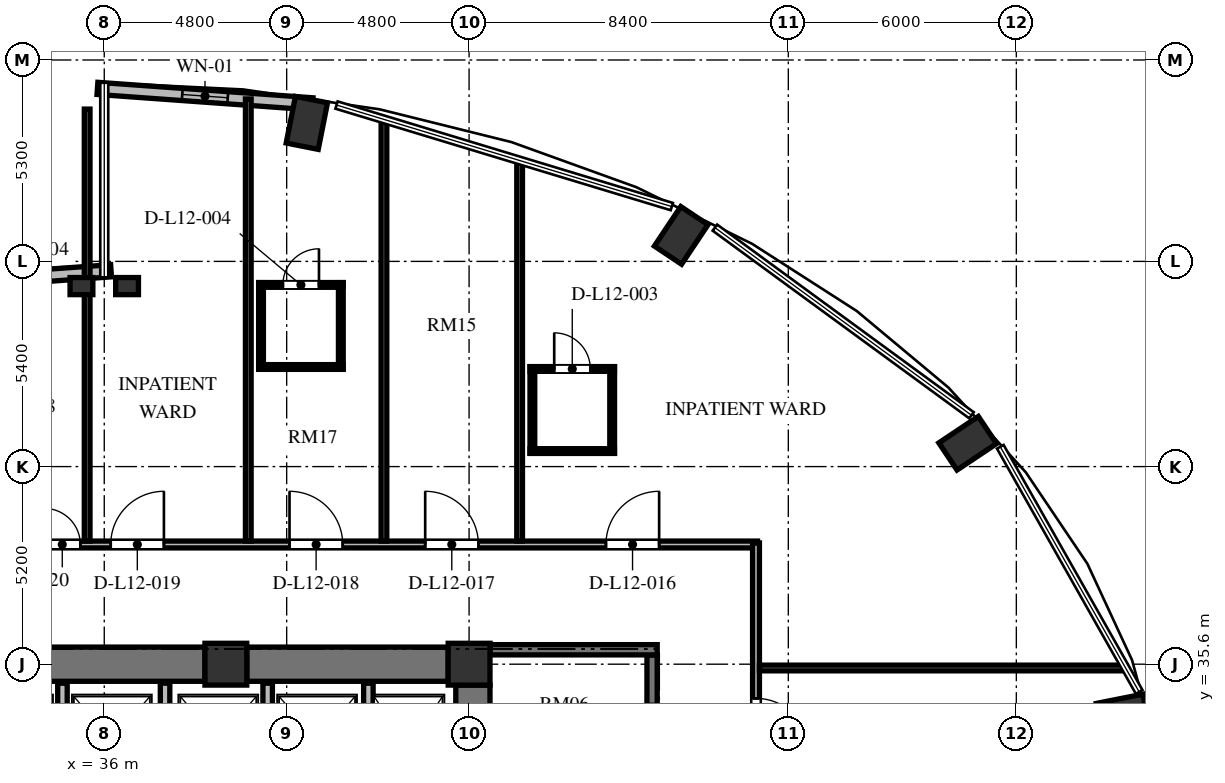
"""IFC4 building model, lengths in metres.
Left out: names, types, materials, properties, quantities, classifications, styles, units other than length and angle.
Written with IfcOpenShell. Run it as: python <this file> out.ifc"""

import sys

from ifc_helpers import new_model, si_unit, direction, frame, frame_2d, origin, origin_2d, place, context, subcontext, project, spatial, rectangle, extrude, element, fill, save


model = new_model("IFC4")
c1 = context("Model", 3, precision=1e-05, world=origin(), true_north=direction((0.0, 1.0)))
c2 = subcontext(c1, "Body", "Model", "MODEL_VIEW")
j1 = project(units=[si_unit("LENGTHUNIT", "METRE"), si_unit("PLANEANGLEUNIT", "RADIAN")], contexts=[c1])
p1 = place(None, origin())
s1 = spatial("IfcSite", under=j1, at=p1, CompositionType="ELEMENT")
p2 = place(p1, origin())
s2 = spatial("IfcBuilding", under=s1, at=p2, CompositionType="ELEMENT")
p3 = place(p2, frame((0.0, 0.0, 50.736)))
s3 = spatial("IfcBuildingStorey", under=s2, at=p3, CompositionType="ELEMENT", Elevation=50.736)
for number, where, z_axis, x_axis in (
    (1, (62.8, 34.268, 0.0), (0.0, 0.0, 1.0), (0.981, 0.195, 0.0)),
    (2, (58.72, 41.414, 0.0), (0.0, 0.0, 1.0), (0.831, 0.556, 0.0)),
    (3, (51.181, 46.884, 0.0), (0.0, 0.0, 1.0), (0.556, 0.831, 0.0)),
    (4, (41.331, 49.844, 0.0), (0.0, 0.0, 1.0), (0.195, 0.981, 0.0)),
):
    element("IfcColumn", number, at=place(p3, frame(where, z_axis=z_axis, x_axis=x_axis)), inside=s3, PredefinedType="COLUMN", context=c2, shape_type="SweptSolid", body=[
        extrude(rectangle(XDim=1.25, YDim=0.86, at=origin_2d()), origin(), (0.0, 0.0, 1.0), 3.648),
    ])
for number, where, z_axis, x_axis in (
    (5, (45.6, 35.6, 0.0), (0.0, 0.0, 1.0), (1.0, 0.0, 0.0)),
    (6, (39.2, 35.6, 0.0), (0.0, 0.0, 1.0), (1.0, 0.0, 0.0)),
):
    element("IfcColumn", number, at=place(p3, frame(where, z_axis=z_axis, x_axis=x_axis)), inside=s3, PredefinedType="COLUMN", context=c2, shape_type="SweptSolid", body=[
        extrude(rectangle(XDim=1.1, YDim=1.1, at=origin_2d()), origin(), (0.0, 0.0, 1.0), 3.648),
    ])
for number, where, z_axis, x_axis in (
    (7, (35.4, 45.55, 0.0), (0.0, 0.0, 1.0), (1.0, 0.0, 0.0)),
    (8, (36.6, 45.55, 0.0), (0.0, 0.0, 1.0), (1.0, 0.0, 0.0)),
):
    element("IfcColumn", number, at=place(p3, frame(where, z_axis=z_axis, x_axis=x_axis)), inside=s3, PredefinedType="PILASTER", context=c2, shape_type="SweptSolid", body=[
        extrude(rectangle(XDim=0.6, YDim=0.45, at=origin_2d()), origin(), (0.0, 0.0, 1.0), 3.648),
    ])
p4 = place(p3, frame((45.7, 20.95, 0.0), z_axis=(0.0, 0.0, 1.0), x_axis=(0.0, 1.0, 0.0)))
e9 = element("IfcWall", 9, at=p4, inside=s3, PredefinedType="SHEAR", context=c2, shape_type="SweptSolid", body=[
    extrude(rectangle(XDim=14.1, YDim=0.9, at=frame_2d((7.05, 0.0))), origin(), (0.0, 0.0, 1.0), 3.648),
])
p5 = place(p4, frame((11.75, 0.0, 0.0)))
e10 = element("IfcOpeningElement", 10, at=p5, cuts=e9, PredefinedType="OPENING", context=c2, shape_type="SweptSolid", body=[
    extrude(rectangle(XDim=1.4, YDim=2.3, at=frame_2d((0.7, 1.15))), frame((0.0, 0.46, 0.0), z_axis=(0.0, -1.0, 0.0), x_axis=(1.0, 0.0, 0.0)), (0.0, 0.0, 1.0), 0.92),
])
p6 = place(p4, frame((0.95, 0.0, 0.0)))
e11 = element("IfcOpeningElement", 11, at=p6, cuts=e9, PredefinedType="OPENING", context=c2, shape_type="SweptSolid", body=[
    extrude(rectangle(XDim=1.4, YDim=2.3, at=frame_2d((0.7, 1.15))), frame((0.0, 0.46, 0.0), z_axis=(0.0, -1.0, 0.0), x_axis=(1.0, 0.0, 0.0)), (0.0, 0.0, 1.0), 0.92),
])
p7 = place(p3, frame((33.35, 35.6, 0.0), z_axis=(0.0, 0.0, 1.0), x_axis=(1.0, 0.0, 0.0)))
e12 = element("IfcWall", 12, at=p7, inside=s3, PredefinedType="SHEAR", context=c2, shape_type="SweptSolid", body=[
    extrude(rectangle(XDim=5.3, YDim=0.9, at=frame_2d((2.65, 0.0))), origin(), (0.0, 0.0, 1.0), 3.648),
])
p8 = place(p3, frame((39.75, 35.6, 0.0), z_axis=(0.0, 0.0, 1.0), x_axis=(1.0, 0.0, 0.0)))
e13 = element("IfcWall", 13, at=p8, inside=s3, PredefinedType="SHEAR", context=c2, shape_type="SweptSolid", body=[
    extrude(rectangle(XDim=5.3, YDim=0.9, at=frame_2d((2.65, 0.0))), origin(), (0.0, 0.0, 1.0), 3.648),
])
p9 = place(p3, frame((41.481, 50.346, 0.0), z_axis=(0.0, 0.0, 1.0), x_axis=(-0.997422321809, 0.071754525696, 0.0)))
e14 = element("IfcWall", 14, at=p9, inside=s3, PredefinedType="SOLIDWALL", context=c2, shape_type="SweptSolid", body=[
    extrude(rectangle(XDim=5.675, YDim=0.32, at=frame_2d((2.838, 0.0))), origin(), (0.0, 0.0, 1.0), 3.428),
])
p10 = place(p9, frame((2.238, 0.0, 0.85)))
e15 = element("IfcOpeningElement", 15, at=p10, cuts=e14, PredefinedType="OPENING", context=c2, shape_type="SweptSolid", body=[
    extrude(rectangle(XDim=1.2, YDim=2.2, at=frame_2d((0.6, 1.1))), frame((0.0, 0.17, 0.0), z_axis=(0.0, -1.0, 0.0), x_axis=(1.0, 0.0, 0.0)), (0.0, 0.0, 1.0), 0.34),
])
p11 = place(p3, frame((36.179, 45.953, 0.0), z_axis=(0.0, 0.0, 1.0), x_axis=(-0.997421878774, -0.071760683825, 0.0)))
e16 = element("IfcWall", 16, at=p11, inside=s3, PredefinedType="SOLIDWALL", context=c2, shape_type="SweptSolid", body=[
    extrude(rectangle(XDim=5.675, YDim=0.32, at=frame_2d((2.837, 0.0))), origin(), (0.0, 0.0, 1.0), 3.428),
])
p12 = place(p11, frame((2.007, 0.0, 0.85)))
e17 = element("IfcOpeningElement", 17, at=p12, cuts=e16, PredefinedType="OPENING", context=c2, shape_type="SweptSolid", body=[
    extrude(rectangle(XDim=1.2, YDim=1.8, at=frame_2d((0.6, 0.9))), frame((0.0, 0.17, 0.0), z_axis=(0.0, -1.0, 0.0), x_axis=(1.0, 0.0, 0.0)), (0.0, 0.0, 1.0), 0.34),
])
p13 = place(p3, frame((42.95, 31.92, 0.0), z_axis=(0.0, 0.0, 1.0), x_axis=(0.0, 1.0, 0.0)))
e18 = element("IfcWall", 18, at=p13, inside=s3, PredefinedType="SOLIDWALL", context=c2, shape_type="SweptSolid", body=[
    extrude(rectangle(XDim=3.18, YDim=0.25, at=frame_2d((1.59, 0.0))), origin(), (0.0, 0.0, 1.0), 3.428),
])
for number, where, z_axis, x_axis in (
    (19, (34.9, 32.42, 0.0), (0.0, 0.0, 1.0), (0.0, 1.0, 0.0)),
    (20, (37.6, 32.42, 0.0), (0.0, 0.0, 1.0), (0.0, 1.0, 0.0)),
    (21, (40.3, 32.42, 0.0), (0.0, 0.0, 1.0), (0.0, 1.0, 0.0)),
):
    element("IfcWall", number, at=place(p3, frame(where, z_axis=z_axis, x_axis=x_axis)), inside=s3, PredefinedType="SOLIDWALL", context=c2, shape_type="SweptSolid", body=[
        extrude(rectangle(XDim=2.68, YDim=0.25, at=frame_2d((1.34, 0.0))), origin(), (0.0, 0.0, 1.0), 3.428),
    ])
p14 = place(p3, frame((50.415, 35.845, 0.0), z_axis=(0.0, 0.0, 1.0), x_axis=(0.0, -1.0, 0.0)))
e22 = element("IfcWall", 22, at=p14, inside=s3, PredefinedType="SHEAR", context=c2, shape_type="SweptSolid", body=[
    extrude(rectangle(XDim=15.825, YDim=0.27, at=frame_2d((7.913, 0.0))), origin(), (0.0, 0.0, 1.0), 3.648),
])
p15 = place(p14, frame((4.445, 0.0, 0.0)))
e23 = element("IfcOpeningElement", 23, at=p15, cuts=e22, PredefinedType="OPENING", context=c2, shape_type="SweptSolid", body=[
    extrude(rectangle(XDim=1.2, YDim=2.15, at=frame_2d((0.6, 1.075))), frame((0.0, 0.145, 0.0), z_axis=(0.0, -1.0, 0.0), x_axis=(1.0, 0.0, 0.0)), (0.0, 0.0, 1.0), 0.29),
])
p16 = place(p14, frame((1.295, 0.0, 0.0)))
e24 = element("IfcOpeningElement", 24, at=p16, cuts=e22, PredefinedType="OPENING", context=c2, shape_type="SweptSolid", body=[
    extrude(rectangle(XDim=1.3, YDim=2.2, at=frame_2d((0.65, 1.1))), frame((0.0, 0.145, 0.0), z_axis=(0.0, -1.0, 0.0), x_axis=(1.0, 0.0, 0.0)), (0.0, 0.0, 1.0), 0.29),
])
p17 = place(p14, frame((13.095, 0.0, 0.0)))
e25 = element("IfcOpeningElement", 25, at=p17, cuts=e22, PredefinedType="OPENING", context=c2, shape_type="SweptSolid", body=[
    extrude(rectangle(XDim=1.3, YDim=2.2, at=frame_2d((0.65, 1.1))), frame((0.0, 0.145, 0.0), z_axis=(0.0, -1.0, 0.0), x_axis=(1.0, 0.0, 0.0)), (0.0, 0.0, 1.0), 0.29),
])
p18 = place(p3, frame((46.15, 35.98, 0.0), z_axis=(0.0, 0.0, 1.0), x_axis=(1.0, 0.0, 0.0)))
e26 = element("IfcWall", 26, at=p18, inside=s3, PredefinedType="SHEAR", context=c2, shape_type="SweptSolid", body=[
    extrude(rectangle(XDim=4.4, YDim=0.27, at=frame_2d((2.2, 0.0))), origin(), (0.0, 0.0, 1.0), 3.648),
])
p19 = place(p3, frame((23.31, 38.75, 0.0), z_axis=(0.0, 0.0, 1.0), x_axis=(1.0, 0.0, 0.0)))
e27 = element("IfcWall", 27, at=p19, inside=s3, PredefinedType="PARTITIONING", context=c2, shape_type="SweptSolid", body=[
    extrude(rectangle(XDim=29.88, YDim=0.18, at=frame_2d((14.94, 0.0))), origin(), (0.0, 0.0, 1.0), 3.053),
])
p20 = place(p19, frame((25.891, 0.0, 0.0)))
e28 = element("IfcOpeningElement", 28, at=p20, cuts=e27, PredefinedType="OPENING", context=c2, shape_type="SweptSolid", body=[
    extrude(rectangle(XDim=1.4, YDim=2.2, at=frame_2d((0.7, 1.1))), frame((0.0, 0.1, 0.0), z_axis=(0.0, -1.0, 0.0), x_axis=(1.0, 0.0, 0.0)), (0.0, 0.0, 1.0), 0.2),
])
p21 = place(p19, frame((21.135, 0.0, 0.0)))
e29 = element("IfcOpeningElement", 29, at=p21, cuts=e27, PredefinedType="OPENING", context=c2, shape_type="SweptSolid", body=[
    extrude(rectangle(XDim=1.4, YDim=2.2, at=frame_2d((0.7, 1.1))), frame((0.0, 0.1, 0.0), z_axis=(0.0, -1.0, 0.0), x_axis=(1.0, 0.0, 0.0)), (0.0, 0.0, 1.0), 0.2),
])
p22 = place(p19, frame((17.565, 0.0, 0.0)))
e30 = element("IfcOpeningElement", 30, at=p22, cuts=e27, PredefinedType="OPENING", context=c2, shape_type="SweptSolid", body=[
    extrude(rectangle(XDim=1.4, YDim=2.2, at=frame_2d((0.7, 1.1))), frame((0.0, 0.1, 0.0), z_axis=(0.0, -1.0, 0.0), x_axis=(1.0, 0.0, 0.0)), (0.0, 0.0, 1.0), 0.2),
])
p23 = place(p19, frame((12.86, 0.0, 0.0)))
e31 = element("IfcOpeningElement", 31, at=p23, cuts=e27, PredefinedType="OPENING", context=c2, shape_type="SweptSolid", body=[
    extrude(rectangle(XDim=1.4, YDim=2.2, at=frame_2d((0.7, 1.1))), frame((0.0, 0.1, 0.0), z_axis=(0.0, -1.0, 0.0), x_axis=(1.0, 0.0, 0.0)), (0.0, 0.0, 1.0), 0.2),
])
p24 = place(p19, frame((11.11, 0.0, 0.0)))
e32 = element("IfcOpeningElement", 32, at=p24, cuts=e27, PredefinedType="OPENING", context=c2, shape_type="SweptSolid", body=[
    extrude(rectangle(XDim=0.95, YDim=2.1, at=frame_2d((0.475, 1.05))), frame((0.0, 0.1, 0.0), z_axis=(0.0, -1.0, 0.0), x_axis=(1.0, 0.0, 0.0)), (0.0, 0.0, 1.0), 0.2),
])
p25 = place(p19, frame((6.845, 0.0, 0.0)))
e33 = element("IfcOpeningElement", 33, at=p25, cuts=e27, PredefinedType="OPENING", context=c2, shape_type="SweptSolid", body=[
    extrude(rectangle(XDim=1.4, YDim=2.2, at=frame_2d((0.7, 1.1))), frame((0.0, 0.1, 0.0), z_axis=(0.0, -1.0, 0.0), x_axis=(1.0, 0.0, 0.0)), (0.0, 0.0, 1.0), 0.2),
])
p26 = place(p19, frame((2.339, 0.0, 0.0)))
e34 = element("IfcOpeningElement", 34, at=p26, cuts=e27, PredefinedType="OPENING", context=c2, shape_type="SweptSolid", body=[
    extrude(rectangle(XDim=1.4, YDim=2.2, at=frame_2d((0.7, 1.1))), frame((0.0, 0.1, 0.0), z_axis=(0.0, -1.0, 0.0), x_axis=(1.0, 0.0, 0.0)), (0.0, 0.0, 1.0), 0.2),
])
p27 = place(p3, frame((53.15, 38.79, 0.0), z_axis=(0.0, 0.0, 1.0), x_axis=(0.0, -1.0, 0.0)))
e35 = element("IfcWall", 35, at=p27, inside=s3, PredefinedType="PARTITIONING", context=c2, shape_type="SweptSolid", body=[
    extrude(rectangle(XDim=9.43, YDim=0.18, at=frame_2d((4.715, 0.0))), origin(), (0.0, 0.0, 1.0), 3.428),
])
p28 = place(p27, frame((4.09, 0.0, 0.0)))
e36 = element("IfcOpeningElement", 36, at=p28, cuts=e35, PredefinedType="OPENING", context=c2, shape_type="SweptSolid", body=[
    extrude(rectangle(XDim=1.4, YDim=2.2, at=frame_2d((0.7, 1.1))), frame((0.0, 0.1, 0.0), z_axis=(0.0, -1.0, 0.0), x_axis=(1.0, 0.0, 0.0)), (0.0, 0.0, 1.0), 0.2),
])
p29 = place(p3, frame((53.24, 35.5, 0.0), z_axis=(0.0, 0.0, 1.0), x_axis=(1.0, 0.0, 0.0)))
e37 = element("IfcWall", 37, at=p29, inside=s3, PredefinedType="PARTITIONING", context=c2, shape_type="SweptSolid", body=[
    extrude(rectangle(XDim=9.632, YDim=0.15, at=frame_2d((4.816, 0.0))), origin(), (0.0, 0.0, 1.0), 3.428),
])
p30 = place(p3, frame((35.55, 38.84, 0.0), z_axis=(0.0, 0.0, 1.0), x_axis=(0.0, 1.0, 0.0)))
e38 = element("IfcWall", 38, at=p30, inside=s3, PredefinedType="PARTITIONING", context=c2, shape_type="SweptSolid", body=[
    extrude(rectangle(XDim=11.367, YDim=0.15, at=frame_2d((5.684, 0.0))), origin(), (0.0, 0.0, 1.0), 3.428),
])
p31 = place(p3, frame((39.79, 38.84, 0.0), z_axis=(0.0, 0.0, 1.0), x_axis=(0.0, 1.0, 0.0)))
e39 = element("IfcWall", 39, at=p31, inside=s3, PredefinedType="PARTITIONING", context=c2, shape_type="SweptSolid", body=[
    extrude(rectangle(XDim=11.635, YDim=0.15, at=frame_2d((5.817, 0.0))), origin(), (0.0, 0.0, 1.0), 2.813),
])
p32 = place(p3, frame((43.36, 38.84, 0.0), z_axis=(0.0, 0.0, 1.0), x_axis=(0.0, 1.0, 0.0)))
e40 = element("IfcWall", 40, at=p32, inside=s3, PredefinedType="PARTITIONING", context=c2, shape_type="SweptSolid", body=[
    extrude(rectangle(XDim=11.084, YDim=0.15, at=frame_2d((5.542, 0.0))), origin(), (0.0, 0.0, 1.0), 3.428),
])
p33 = place(p3, frame((46.93, 38.84, 0.0), z_axis=(0.0, 0.0, 1.0), x_axis=(0.0, 1.0, 0.0)))
e41 = element("IfcWall", 41, at=p33, inside=s3, PredefinedType="PARTITIONING", context=c2, shape_type="SweptSolid", body=[
    extrude(rectangle(XDim=10.003, YDim=0.15, at=frame_2d((5.001, 0.0))), origin(), (0.0, 0.0, 1.0), 3.428),
])
p34 = place(p3, frame((47.205, 43.369, 0.0), z_axis=(0.0, 0.0, 1.0), x_axis=(1.0, 0.0, 0.0)))
e42 = element("IfcWall", 42, at=p34, inside=s3, PredefinedType="PARTITIONING", context=c2, shape_type="SweptSolid", body=[
    extrude(rectangle(XDim=2.22, YDim=0.125, at=frame_2d((1.11, 0.0))), origin(), (0.0, 0.0, 1.0), 3.428),
])
p35 = place(p34, frame((0.635, 0.0, 0.0)))
e43 = element("IfcOpeningElement", 43, at=p35, cuts=e42, PredefinedType="OPENING", context=c2, shape_type="SweptSolid", body=[
    extrude(rectangle(XDim=0.95, YDim=2.1, at=frame_2d((0.475, 1.05))), frame((0.0, 0.073, 0.0), z_axis=(0.0, -1.0, 0.0), x_axis=(1.0, 0.0, 0.0)), (0.0, 0.0, 1.0), 0.145),
])
p36 = place(p3, frame((47.205, 41.209, 0.0), z_axis=(0.0, 0.0, 1.0), x_axis=(1.0, 0.0, 0.0)))
e44 = element("IfcWall", 44, at=p36, inside=s3, PredefinedType="PARTITIONING", context=c2, shape_type="SweptSolid", body=[
    extrude(rectangle(XDim=2.22, YDim=0.125, at=frame_2d((1.11, 0.0))), origin(), (0.0, 0.0, 1.0), 3.428),
])
for number, where, z_axis, x_axis in (
    (45, (49.365, 41.149, 0.0), (0.0, 0.0, 1.0), (0.0, 1.0, 0.0)),
    (46, (47.265, 41.149, 0.0), (0.0, 0.0, 1.0), (0.0, 1.0, 0.0)),
):
    element("IfcWall", number, at=place(p3, frame(where, z_axis=z_axis, x_axis=x_axis)), inside=s3, PredefinedType="PARTITIONING", context=c2, shape_type="SweptSolid", body=[
        extrude(rectangle(XDim=2.28, YDim=0.125, at=frame_2d((1.14, 0.0))), origin(), (0.0, 0.0, 1.0), 3.428),
    ])
p37 = place(p3, frame((40.065, 45.581, 0.0), z_axis=(0.0, 0.0, 1.0), x_axis=(1.0, 0.0, 0.0)))
e47 = element("IfcWall", 47, at=p37, inside=s3, PredefinedType="PARTITIONING", context=c2, shape_type="SweptSolid", body=[
    extrude(rectangle(XDim=2.22, YDim=0.125, at=frame_2d((1.11, 0.0))), origin(), (0.0, 0.0, 1.0), 3.428),
])
p38 = place(p37, frame((0.635, 0.0, 0.0)))
e48 = element("IfcOpeningElement", 48, at=p38, cuts=e47, PredefinedType="OPENING", context=c2, shape_type="SweptSolid", body=[
    extrude(rectangle(XDim=0.95, YDim=2.1, at=frame_2d((0.475, 1.05))), frame((0.0, 0.073, 0.0), z_axis=(0.0, -1.0, 0.0), x_axis=(1.0, 0.0, 0.0)), (0.0, 0.0, 1.0), 0.145),
])
p39 = place(p3, frame((40.065, 43.421, 0.0), z_axis=(0.0, 0.0, 1.0), x_axis=(1.0, 0.0, 0.0)))
e49 = element("IfcWall", 49, at=p39, inside=s3, PredefinedType="PARTITIONING", context=c2, shape_type="SweptSolid", body=[
    extrude(rectangle(XDim=2.22, YDim=0.125, at=frame_2d((1.11, 0.0))), origin(), (0.0, 0.0, 1.0), 3.428),
])
for number, where, z_axis, x_axis in (
    (50, (42.225, 43.361, 0.0), (0.0, 0.0, 1.0), (0.0, 1.0, 0.0)),
    (51, (40.125, 43.361, 0.0), (0.0, 0.0, 1.0), (0.0, 1.0, 0.0)),
):
    element("IfcWall", number, at=place(p3, frame(where, z_axis=z_axis, x_axis=x_axis)), inside=s3, PredefinedType="PARTITIONING", context=c2, shape_type="SweptSolid", body=[
        extrude(rectangle(XDim=2.28, YDim=0.125, at=frame_2d((1.14, 0.0))), origin(), (0.0, 0.0, 1.0), 3.428),
    ])
p40 = place(p10, origin())
e52 = element("IfcWindow", 52, at=p40, inside=s3, PartitioningType="SINGLE_PANEL", PredefinedType="WINDOW", context=c2, shape_type="SweptSolid", body=[
    extrude(rectangle(XDim=1.2, YDim=2.2, at=frame_2d((0.6, 1.1))), frame((0.0, 0.03, 0.0), z_axis=(0.0, -1.0, 0.0), x_axis=(1.0, 0.0, 0.0)), (0.0, 0.0, 1.0), 0.06),
])
fill(e15, e52)
p41 = place(p28, origin())
e53 = element("IfcDoor", 53, at=p41, inside=s3, OperationType="SINGLE_SWING_RIGHT", PredefinedType="DOOR", context=c2, shape_type="SweptSolid", body=[
    extrude(rectangle(XDim=1.4, YDim=2.2, at=frame_2d((0.7, 1.1))), frame((0.0, 0.025, 0.0), z_axis=(0.0, -1.0, 0.0), x_axis=(1.0, 0.0, 0.0)), (0.0, 0.0, 1.0), 0.05),
])
fill(e36, e53)
p42 = place(p35, origin())
e54 = element("IfcDoor", 54, at=p42, inside=s3, OperationType="SINGLE_SWING_LEFT", PredefinedType="DOOR", context=c2, shape_type="SweptSolid", body=[
    extrude(rectangle(XDim=0.95, YDim=2.1, at=frame_2d((0.475, 1.05))), frame((0.0, 0.025, 0.0), z_axis=(0.0, -1.0, 0.0), x_axis=(1.0, 0.0, 0.0)), (0.0, 0.0, 1.0), 0.05),
])
fill(e43, e54)
p43 = place(p20, origin())
e55 = element("IfcDoor", 55, at=p43, inside=s3, OperationType="SINGLE_SWING_RIGHT", PredefinedType="DOOR", context=c2, shape_type="SweptSolid", body=[
    extrude(rectangle(XDim=1.4, YDim=2.2, at=frame_2d((0.7, 1.1))), frame((0.0, 0.025, 0.0), z_axis=(0.0, -1.0, 0.0), x_axis=(1.0, 0.0, 0.0)), (0.0, 0.0, 1.0), 0.05),
])
fill(e28, e55)
p44 = place(p21, origin())
e56 = element("IfcDoor", 56, at=p44, inside=s3, OperationType="SINGLE_SWING_LEFT", PredefinedType="DOOR", context=c2, shape_type="SweptSolid", body=[
    extrude(rectangle(XDim=1.4, YDim=2.2, at=frame_2d((0.7, 1.1))), frame((0.0, 0.025, 0.0), z_axis=(0.0, -1.0, 0.0), x_axis=(1.0, 0.0, 0.0)), (0.0, 0.0, 1.0), 0.05),
])
fill(e29, e56)
p45 = place(p38, origin())
e57 = element("IfcDoor", 57, at=p45, inside=s3, OperationType="SINGLE_SWING_RIGHT", PredefinedType="DOOR", context=c2, shape_type="SweptSolid", body=[
    extrude(rectangle(XDim=0.95, YDim=2.1, at=frame_2d((0.475, 1.05))), frame((0.0, 0.025, 0.0), z_axis=(0.0, -1.0, 0.0), x_axis=(1.0, 0.0, 0.0)), (0.0, 0.0, 1.0), 0.05),
])
fill(e48, e57)
p46 = place(p22, origin())
e58 = element("IfcDoor", 58, at=p46, inside=s3, OperationType="SINGLE_SWING_LEFT", PredefinedType="DOOR", context=c2, shape_type="SweptSolid", body=[
    extrude(rectangle(XDim=1.4, YDim=2.2, at=frame_2d((0.7, 1.1))), frame((0.0, 0.025, 0.0), z_axis=(0.0, -1.0, 0.0), x_axis=(1.0, 0.0, 0.0)), (0.0, 0.0, 1.0), 0.05),
])
fill(e30, e58)
p47 = place(p23, origin())
e59 = element("IfcDoor", 59, at=p47, inside=s3, OperationType="SINGLE_SWING_RIGHT", PredefinedType="DOOR", context=c2, shape_type="SweptSolid", body=[
    extrude(rectangle(XDim=1.4, YDim=2.2, at=frame_2d((0.7, 1.1))), frame((0.0, 0.025, 0.0), z_axis=(0.0, -1.0, 0.0), x_axis=(1.0, 0.0, 0.0)), (0.0, 0.0, 1.0), 0.05),
])
fill(e31, e59)
p48 = place(p24, origin())
e60 = element("IfcDoor", 60, at=p48, inside=s3, OperationType="SINGLE_SWING_LEFT", PredefinedType="DOOR", context=c2, shape_type="SweptSolid", body=[
    extrude(rectangle(XDim=0.95, YDim=2.1, at=frame_2d((0.475, 1.05))), frame((0.0, 0.025, 0.0), z_axis=(0.0, -1.0, 0.0), x_axis=(1.0, 0.0, 0.0)), (0.0, 0.0, 1.0), 0.05),
])
fill(e32, e60)
save(model, sys.argv[1])
